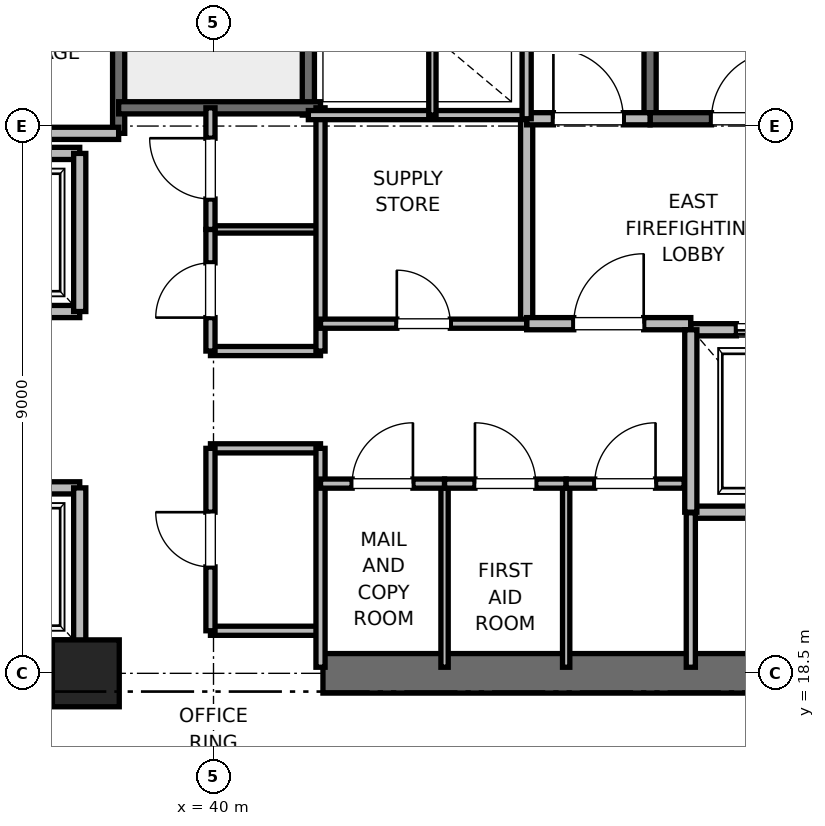
"""IFC4 building model, lengths in metres.
Left out: names, types, materials, properties, quantities, classifications, styles, units other than length and angle.
Written with IfcOpenShell. Run it as: python <this file> out.ifc"""

import sys

from ifc_helpers import new_model, si_unit, direction, frame, frame_2d, origin, origin_2d, place, context, subcontext, project, spatial, rectangle, extrude, element, fill, save


model = new_model("IFC4")
c1 = context("Model", 3, precision=1e-05, world=origin(), true_north=direction((0.0, 1.0)))
c2 = subcontext(c1, "Body", "Model", "MODEL_VIEW")
j1 = project(units=[si_unit("LENGTHUNIT", "METRE"), si_unit("PLANEANGLEUNIT", "RADIAN")], contexts=[c1])
p1 = place(None, origin())
s1 = spatial("IfcSite", under=j1, at=p1, CompositionType="ELEMENT")
p2 = place(p1, origin())
s2 = spatial("IfcBuilding", under=s1, at=p2, CompositionType="ELEMENT")
p3 = place(p2, frame((0.0, 0.0, 75.6)))
s3 = spatial("IfcBuildingStorey", under=s2, at=p3, CompositionType="ELEMENT", Elevation=75.6)
p4 = place(p3, frame((37.9, 18.5, 0.0), z_axis=(0.0, 0.0, 1.0), x_axis=(1.0, 0.0, 0.0)))
e1 = element("IfcColumn", 1, at=p4, inside=s3, PredefinedType="PILASTER", context=c2, shape_type="SweptSolid", body=[
    extrude(rectangle(XDim=1.1, YDim=1.1, at=origin_2d()), origin(), (0.0, 0.0, 1.0), 4.0),
])
for number, where, z_axis, x_axis in (
    (2, (29.0, 18.5, 0.0), (0.0, 0.0, 1.0), (1.0, 0.0, 0.0)),
    (3, (41.8, 18.5, 0.0), (0.0, 0.0, 1.0), (1.0, 0.0, 0.0)),
):
    element("IfcWall", number, at=place(p3, frame(where, z_axis=z_axis, x_axis=x_axis)), inside=s3, PredefinedType="SHEAR", context=c2, shape_type="SweptSolid", body=[
        extrude(rectangle(XDim=9.2, YDim=0.65, at=frame_2d((4.6, 0.0))), origin(), (0.0, 0.0, 1.0), 3.76),
    ])
p5 = place(p3, frame((47.18, 27.62, 0.0), z_axis=(0.0, 0.0, 1.0), x_axis=(0.0, 1.0, 0.0)))
e4 = element("IfcWall", 4, at=p5, inside=s3, PredefinedType="SOLIDWALL", context=c2, shape_type="SweptSolid", body=[
    extrude(rectangle(XDim=8.18, YDim=0.2, at=frame_2d((4.09, 0.0))), origin(), (0.0, 0.0, 1.0), 3.76),
])
p6 = place(p3, frame((47.18, 27.62, 0.0), z_axis=(0.0, 0.0, 1.0), x_axis=(1.0, 0.0, 0.0)))
e5 = element("IfcWall", 5, at=p6, inside=s3, PredefinedType="SOLIDWALL", context=c2, shape_type="SweptSolid", body=[
    extrude(rectangle(XDim=3.12, YDim=0.2, at=frame_2d((1.56, 0.0))), origin(), (0.0, 0.0, 1.0), 3.76),
])
p7 = place(p6, frame((1.01, 0.0, 0.0)))
e6 = element("IfcOpeningElement", 6, at=p7, cuts=e5, PredefinedType="OPENING", context=c2, shape_type="SweptSolid", body=[
    extrude(rectangle(XDim=1.1, YDim=2.15, at=frame_2d((0.55, 1.075))), frame((0.0, 0.1, 0.0), z_axis=(0.0, -1.0, 0.0), x_axis=(1.0, 0.0, 0.0)), (0.0, 0.0, 1.0), 0.2),
])
p8 = place(p3, frame((38.44, 27.38, 0.0), z_axis=(0.0, 0.0, 1.0), x_axis=(0.0, 1.0, 0.0)))
e7 = element("IfcWall", 7, at=p8, inside=s3, PredefinedType="SOLIDWALL", context=c2, shape_type="SweptSolid", body=[
    extrude(rectangle(XDim=8.87, YDim=0.2, at=frame_2d((4.435, 0.0))), origin(), (0.0, 0.0, 1.0), 3.76),
])
p9 = place(p3, frame((41.56, 27.68, 0.0), z_axis=(0.0, 0.0, 1.0), x_axis=(0.0, 1.0, 0.0)))
e8 = element("IfcWall", 8, at=p9, inside=s3, PredefinedType="SOLIDWALL", context=c2, shape_type="SweptSolid", body=[
    extrude(rectangle(XDim=8.57, YDim=0.2, at=frame_2d((4.285, 0.0))), origin(), (0.0, 0.0, 1.0), 3.76),
])
p10 = place(p3, frame((38.44, 27.8, 0.0), z_axis=(0.0, 0.0, 1.0), x_axis=(1.0, 0.0, 0.0)))
e9 = element("IfcWall", 9, at=p10, inside=s3, PredefinedType="SOLIDWALL", context=c2, shape_type="SweptSolid", body=[
    extrude(rectangle(XDim=3.32, YDim=0.2, at=frame_2d((1.66, 0.0))), origin(), (0.0, 0.0, 1.0), 3.76),
])
p11 = place(p3, frame((32.82, 27.38, 0.0), z_axis=(0.0, 0.0, 1.0), x_axis=(1.0, 0.0, 0.0)))
e10 = element("IfcWall", 10, at=p11, inside=s3, PredefinedType="PARTITIONING", context=c2, shape_type="SweptSolid", body=[
    extrude(rectangle(XDim=5.62, YDim=0.2, at=frame_2d((2.81, 0.0))), origin(), (0.0, 0.0, 1.0), 3.76),
])
p12 = place(p3, frame((45.15, 24.25, 0.0), z_axis=(0.0, 0.0, 1.0), x_axis=(0.0, 1.0, 0.0)))
e11 = element("IfcWall", 11, at=p12, inside=s3, PredefinedType="PARTITIONING", context=c2, shape_type="SweptSolid", body=[
    extrude(rectangle(XDim=3.37, YDim=0.2, at=frame_2d((1.685, 0.0))), origin(), (0.0, 0.0, 1.0), 3.76),
])
p13 = place(p3, frame((45.15, 24.25, 0.0), z_axis=(0.0, 0.0, 1.0), x_axis=(1.0, 0.0, 0.0)))
e12 = element("IfcWall", 12, at=p13, inside=s3, PredefinedType="PARTITIONING", context=c2, shape_type="SweptSolid", body=[
    extrude(rectangle(XDim=2.7, YDim=0.2, at=frame_2d((1.35, 0.0))), origin(), (0.0, 0.0, 1.0), 3.76),
])
p14 = place(p13, frame((0.775, 0.0, 0.0)))
e13 = element("IfcOpeningElement", 13, at=p14, cuts=e12, PredefinedType="OPENING", context=c2, shape_type="SweptSolid", body=[
    extrude(rectangle(XDim=1.15, YDim=2.2, at=frame_2d((0.575, 1.1))), frame((0.0, 0.1, 0.0), z_axis=(0.0, -1.0, 0.0), x_axis=(1.0, 0.0, 0.0)), (0.0, 0.0, 1.0), 0.2),
])
p15 = place(p3, frame((45.15, 27.62, 0.0), z_axis=(0.0, 0.0, 1.0), x_axis=(1.0, 0.0, 0.0)))
e14 = element("IfcWall", 14, at=p15, inside=s3, PredefinedType="PARTITIONING", context=c2, shape_type="SweptSolid", body=[
    extrude(rectangle(XDim=2.03, YDim=0.2, at=frame_2d((1.015, 0.0))), origin(), (0.0, 0.0, 1.0), 3.76),
])
p16 = place(p15, frame((0.44, 0.0, 0.0)))
e15 = element("IfcOpeningElement", 15, at=p16, cuts=e14, PredefinedType="OPENING", context=c2, shape_type="SweptSolid", body=[
    extrude(rectangle(XDim=1.15, YDim=2.2, at=frame_2d((0.575, 1.1))), frame((0.0, 0.1, 0.0), z_axis=(0.0, -1.0, 0.0), x_axis=(1.0, 0.0, 0.0)), (0.0, 0.0, 1.0), 0.2),
])
p17 = place(p3, frame((47.85, 21.15, 0.0), z_axis=(0.0, 0.0, 1.0), x_axis=(1.0, 0.0, 0.0)))
e16 = element("IfcWall", 16, at=p17, inside=s3, PredefinedType="SOLIDWALL", context=c2, shape_type="SweptSolid", body=[
    extrude(rectangle(XDim=2.6, YDim=0.2, at=frame_2d((1.3, 0.0))), origin(), (0.0, 0.0, 1.0), 3.76),
])
p18 = place(p3, frame((50.45, 24.15, 0.0), z_axis=(0.0, 0.0, 1.0), x_axis=(-1.0, 0.0, 0.0)))
e17 = element("IfcWall", 17, at=p18, inside=s3, PredefinedType="SOLIDWALL", context=c2, shape_type="SweptSolid", body=[
    extrude(rectangle(XDim=2.6, YDim=0.2, at=frame_2d((1.3, 0.0))), origin(), (0.0, 0.0, 1.0), 2.54),
])
p19 = place(p18, frame((0.75, 0.0, 0.0)))
e18 = element("IfcOpeningElement", 18, at=p19, cuts=e17, PredefinedType="OPENING", context=c2, shape_type="SweptSolid", body=[
    extrude(rectangle(XDim=1.1, YDim=2.2, at=frame_2d((0.55, 1.1))), frame((0.0, 0.1, 0.0), z_axis=(0.0, -1.0, 0.0), x_axis=(1.0, 0.0, 0.0)), (0.0, 0.0, 1.0), 0.2),
])
p20 = place(p3, frame((47.85, 24.15, 0.0), z_axis=(0.0, 0.0, 1.0), x_axis=(0.0, -1.0, 0.0)))
e19 = element("IfcWall", 19, at=p20, inside=s3, PredefinedType="SOLIDWALL", context=c2, shape_type="SweptSolid", body=[
    extrude(rectangle(XDim=3.0, YDim=0.2, at=frame_2d((1.5, 0.0))), origin(), (0.0, 0.0, 1.0), 3.76),
])
p21 = place(p3, frame((35.5, 18.95, 0.0), z_axis=(0.0, 0.0, 1.0), x_axis=(1.0, 0.0, 0.0)))
e20 = element("IfcWall", 20, at=p21, inside=s3, PredefinedType="SOLIDWALL", context=c2, shape_type="SweptSolid", body=[
    extrude(rectangle(XDim=2.3, YDim=0.2, at=frame_2d((1.15, 0.0))), origin(), (0.0, 0.0, 1.0), 2.54),
])
p22 = place(p3, frame((37.8, 21.55, 0.0), z_axis=(0.0, 0.0, 1.0), x_axis=(-1.0, 0.0, 0.0)))
e21 = element("IfcWall", 21, at=p22, inside=s3, PredefinedType="SOLIDWALL", context=c2, shape_type="SweptSolid", body=[
    extrude(rectangle(XDim=2.3, YDim=0.2, at=frame_2d((1.15, 0.0))), origin(), (0.0, 0.0, 1.0), 3.76),
])
p23 = place(p22, frame((0.6, 0.0, 0.0)))
e22 = element("IfcOpeningElement", 22, at=p23, cuts=e21, PredefinedType="OPENING", context=c2, shape_type="SweptSolid", body=[
    extrude(rectangle(XDim=1.1, YDim=2.2, at=frame_2d((0.55, 1.1))), frame((0.0, 0.1, 0.0), z_axis=(0.0, -1.0, 0.0), x_axis=(1.0, 0.0, 0.0)), (0.0, 0.0, 1.0), 0.2),
])
p24 = place(p3, frame((37.8, 18.95, 0.0), z_axis=(0.0, 0.0, 1.0), x_axis=(0.0, 1.0, 0.0)))
e23 = element("IfcWall", 23, at=p24, inside=s3, PredefinedType="SOLIDWALL", context=c2, shape_type="SweptSolid", body=[
    extrude(rectangle(XDim=2.6, YDim=0.2, at=frame_2d((1.3, 0.0))), origin(), (0.0, 0.0, 1.0), 2.54),
])
p25 = place(p3, frame((35.5, 24.45, 0.0), z_axis=(0.0, 0.0, 1.0), x_axis=(1.0, 0.0, 0.0)))
e24 = element("IfcWall", 24, at=p25, inside=s3, PredefinedType="SOLIDWALL", context=c2, shape_type="SweptSolid", body=[
    extrude(rectangle(XDim=2.3, YDim=0.2, at=frame_2d((1.15, 0.0))), origin(), (0.0, 0.0, 1.0), 3.76),
])
p26 = place(p25, frame((0.6, 0.0, 0.0)))
e25 = element("IfcOpeningElement", 25, at=p26, cuts=e24, PredefinedType="OPENING", context=c2, shape_type="SweptSolid", body=[
    extrude(rectangle(XDim=1.1, YDim=2.2, at=frame_2d((0.55, 1.1))), frame((0.0, 0.1, 0.0), z_axis=(0.0, -1.0, 0.0), x_axis=(1.0, 0.0, 0.0)), (0.0, 0.0, 1.0), 0.2),
])
p27 = place(p3, frame((37.8, 27.05, 0.0), z_axis=(0.0, 0.0, 1.0), x_axis=(-1.0, 0.0, 0.0)))
e26 = element("IfcWall", 26, at=p27, inside=s3, PredefinedType="SOLIDWALL", context=c2, shape_type="SweptSolid", body=[
    extrude(rectangle(XDim=2.3, YDim=0.2, at=frame_2d((1.15, 0.0))), origin(), (0.0, 0.0, 1.0), 3.76),
])
p28 = place(p3, frame((37.8, 24.45, 0.0), z_axis=(0.0, 0.0, 1.0), x_axis=(0.0, 1.0, 0.0)))
e27 = element("IfcWall", 27, at=p28, inside=s3, PredefinedType="SOLIDWALL", context=c2, shape_type="SweptSolid", body=[
    extrude(rectangle(XDim=2.6, YDim=0.2, at=frame_2d((1.3, 0.0))), origin(), (0.0, 0.0, 1.0), 3.76),
])
for number, where, z_axis, x_axis in (
    (28, (39.95, 19.2, 0.0), (0.0, 0.0, 1.0), (1.0, 0.0, 0.0)),
    (29, (39.95, 22.2, 0.0), (0.0, 0.0, 1.0), (1.0, 0.0, 0.0)),
    (30, (39.95, 23.8, 0.0), (0.0, 0.0, 1.0), (1.0, 0.0, 0.0)),
):
    element("IfcWall", number, at=place(p3, frame(where, z_axis=z_axis, x_axis=x_axis)), inside=s3, PredefinedType="PARTITIONING", context=c2, shape_type="SweptSolid", body=[
        extrude(rectangle(XDim=1.81, YDim=0.15, at=frame_2d((0.905, 0.0))), origin(), (0.0, 0.0, 1.0), 2.85),
    ])
p29 = place(p3, frame((39.95, 25.8, 0.0), z_axis=(0.0, 0.0, 1.0), x_axis=(1.0, 0.0, 0.0)))
e31 = element("IfcWall", 31, at=p29, inside=s3, PredefinedType="PARTITIONING", context=c2, shape_type="SweptSolid", body=[
    extrude(rectangle(XDim=1.81, YDim=0.12, at=frame_2d((0.905, 0.0))), origin(), (0.0, 0.0, 1.0), 2.85),
])
p30 = place(p3, frame((41.76, 18.6, 0.0), z_axis=(0.0, 0.0, 1.0), x_axis=(0.0, 1.0, 0.0)))
e32 = element("IfcWall", 32, at=p30, inside=s3, PredefinedType="PARTITIONING", context=c2, shape_type="SweptSolid", body=[
    extrude(rectangle(XDim=3.6, YDim=0.15, at=frame_2d((1.8, 0.0))), origin(), (0.0, 0.0, 1.0), 2.54),
])
p31 = place(p3, frame((41.76, 23.8, 0.0), z_axis=(0.0, 0.0, 1.0), x_axis=(0.0, 1.0, 0.0)))
e33 = element("IfcWall", 33, at=p31, inside=s3, PredefinedType="PARTITIONING", context=c2, shape_type="SweptSolid", body=[
    extrude(rectangle(XDim=4.0, YDim=0.15, at=frame_2d((2.0, 0.0))), origin(), (0.0, 0.0, 1.0), 2.85),
])
p32 = place(p3, frame((39.95, 19.2, 0.0), z_axis=(0.0, 0.0, 1.0), x_axis=(0.0, 1.0, 0.0)))
e34 = element("IfcWall", 34, at=p32, inside=s3, PredefinedType="PARTITIONING", context=c2, shape_type="SweptSolid", body=[
    extrude(rectangle(XDim=3.0, YDim=0.15, at=frame_2d((1.5, 0.0))), origin(), (0.0, 0.0, 1.0), 2.85),
])
p33 = place(p32, frame((1.05, 0.0, 0.0)))
e35 = element("IfcOpeningElement", 35, at=p33, cuts=e34, PredefinedType="OPENING", context=c2, shape_type="SweptSolid", body=[
    extrude(rectangle(XDim=0.9, YDim=2.1, at=frame_2d((0.45, 1.05))), frame((0.0, 0.075, 0.0), z_axis=(0.0, -1.0, 0.0), x_axis=(1.0, 0.0, 0.0)), (0.0, 0.0, 1.0), 0.15),
])
p34 = place(p3, frame((39.95, 23.8, 0.0), z_axis=(0.0, 0.0, 1.0), x_axis=(0.0, 1.0, 0.0)))
e36 = element("IfcWall", 36, at=p34, inside=s3, PredefinedType="PARTITIONING", context=c2, shape_type="SweptSolid", body=[
    extrude(rectangle(XDim=2.0, YDim=0.15, at=frame_2d((1.0, 0.0))), origin(), (0.0, 0.0, 1.0), 2.85),
])
p35 = place(p34, frame((0.55, 0.0, 0.0)))
e37 = element("IfcOpeningElement", 37, at=p35, cuts=e36, PredefinedType="OPENING", context=c2, shape_type="SweptSolid", body=[
    extrude(rectangle(XDim=0.9, YDim=2.1, at=frame_2d((0.45, 1.05))), frame((0.0, 0.075, 0.0), z_axis=(0.0, -1.0, 0.0), x_axis=(1.0, 0.0, 0.0)), (0.0, 0.0, 1.0), 0.15),
])
p36 = place(p3, frame((39.95, 25.8, 0.0), z_axis=(0.0, 0.0, 1.0), x_axis=(0.0, 1.0, 0.0)))
e38 = element("IfcWall", 38, at=p36, inside=s3, PredefinedType="PARTITIONING", context=c2, shape_type="SweptSolid", body=[
    extrude(rectangle(XDim=2.0, YDim=0.15, at=frame_2d((1.0, 0.0))), origin(), (0.0, 0.0, 1.0), 2.85),
])
p37 = place(p36, frame((0.5, 0.0, 0.0)))
e39 = element("IfcOpeningElement", 39, at=p37, cuts=e38, PredefinedType="OPENING", context=c2, shape_type="SweptSolid", body=[
    extrude(rectangle(XDim=1.0, YDim=2.15, at=frame_2d((0.5, 1.075))), frame((0.0, 0.075, 0.0), z_axis=(0.0, -1.0, 0.0), x_axis=(1.0, 0.0, 0.0)), (0.0, 0.0, 1.0), 0.15),
])
p38 = place(p3, frame((41.56, 27.68, 0.0), z_axis=(0.0, 0.0, 1.0), x_axis=(1.0, 0.0, 0.0)))
e40 = element("IfcWall", 40, at=p38, inside=s3, PredefinedType="PARTITIONING", context=c2, shape_type="SweptSolid", body=[
    extrude(rectangle(XDim=3.59, YDim=0.15, at=frame_2d((1.795, 0.0))), origin(), (0.0, 0.0, 1.0), 2.85),
])
p39 = place(p3, frame((47.85, 18.6, 0.0), z_axis=(0.0, 0.0, 1.0), x_axis=(0.0, 1.0, 0.0)))
e41 = element("IfcWall", 41, at=p39, inside=s3, PredefinedType="PARTITIONING", context=c2, shape_type="SweptSolid", body=[
    extrude(rectangle(XDim=2.54, YDim=0.15, at=frame_2d((1.27, 0.0))), origin(), (0.0, 0.0, 1.0), 2.85),
])
for number, where, z_axis, x_axis in (
    (42, (43.8, 18.6, 0.0), (0.0, 0.0, 1.0), (0.0, 1.0, 0.0)),
    (43, (45.8, 18.6, 0.0), (0.0, 0.0, 1.0), (0.0, 1.0, 0.0)),
):
    element("IfcWall", number, at=place(p3, frame(where, z_axis=z_axis, x_axis=x_axis)), inside=s3, PredefinedType="PARTITIONING", context=c2, shape_type="SweptSolid", body=[
        extrude(rectangle(XDim=3.02, YDim=0.12, at=frame_2d((1.51, 0.0))), origin(), (0.0, 0.0, 1.0), 2.85),
    ])
p40 = place(p3, frame((41.76, 21.62, 0.0), z_axis=(0.0, 0.0, 1.0), x_axis=(1.0, 0.0, 0.0)))
e44 = element("IfcWall", 44, at=p40, inside=s3, PredefinedType="PARTITIONING", context=c2, shape_type="SweptSolid", body=[
    extrude(rectangle(XDim=2.04, YDim=0.15, at=frame_2d((1.02, 0.0))), origin(), (0.0, 0.0, 1.0), 2.85),
])
p41 = place(p40, frame((0.52, 0.0, 0.0)))
e45 = element("IfcOpeningElement", 45, at=p41, cuts=e44, PredefinedType="OPENING", context=c2, shape_type="SweptSolid", body=[
    extrude(rectangle(XDim=1.0, YDim=2.15, at=frame_2d((0.5, 1.075))), frame((0.0, 0.075, 0.0), z_axis=(0.0, -1.0, 0.0), x_axis=(1.0, 0.0, 0.0)), (0.0, 0.0, 1.0), 0.15),
])
p42 = place(p3, frame((43.8, 21.62, 0.0), z_axis=(0.0, 0.0, 1.0), x_axis=(1.0, 0.0, 0.0)))
e46 = element("IfcWall", 46, at=p42, inside=s3, PredefinedType="PARTITIONING", context=c2, shape_type="SweptSolid", body=[
    extrude(rectangle(XDim=2.0, YDim=0.15, at=frame_2d((1.0, 0.0))), origin(), (0.0, 0.0, 1.0), 2.85),
])
p43 = place(p42, frame((0.5, 0.0, 0.0)))
e47 = element("IfcOpeningElement", 47, at=p43, cuts=e46, PredefinedType="OPENING", context=c2, shape_type="SweptSolid", body=[
    extrude(rectangle(XDim=1.0, YDim=2.15, at=frame_2d((0.5, 1.075))), frame((0.0, 0.075, 0.0), z_axis=(0.0, -1.0, 0.0), x_axis=(1.0, 0.0, 0.0)), (0.0, 0.0, 1.0), 0.15),
])
p44 = place(p3, frame((45.8, 21.62, 0.0), z_axis=(0.0, 0.0, 1.0), x_axis=(1.0, 0.0, 0.0)))
e48 = element("IfcWall", 48, at=p44, inside=s3, PredefinedType="PARTITIONING", context=c2, shape_type="SweptSolid", body=[
    extrude(rectangle(XDim=1.94, YDim=0.15, at=frame_2d((0.97, 0.0))), origin(), (0.0, 0.0, 1.0), 2.85),
])
p45 = place(p44, frame((0.47, 0.0, 0.0)))
e49 = element("IfcOpeningElement", 49, at=p45, cuts=e48, PredefinedType="OPENING", context=c2, shape_type="SweptSolid", body=[
    extrude(rectangle(XDim=1.0, YDim=2.15, at=frame_2d((0.5, 1.075))), frame((0.0, 0.075, 0.0), z_axis=(0.0, -1.0, 0.0), x_axis=(1.0, 0.0, 0.0)), (0.0, 0.0, 1.0), 0.15),
])
p46 = place(p3, frame((41.76, 24.25, 0.0), z_axis=(0.0, 0.0, 1.0), x_axis=(1.0, 0.0, 0.0)))
e50 = element("IfcWall", 50, at=p46, inside=s3, PredefinedType="PARTITIONING", context=c2, shape_type="SweptSolid", body=[
    extrude(rectangle(XDim=3.39, YDim=0.15, at=frame_2d((1.695, 0.0))), origin(), (0.0, 0.0, 1.0), 2.85),
])
p47 = place(p46, frame((1.255, 0.0, 0.0)))
e51 = element("IfcOpeningElement", 51, at=p47, cuts=e50, PredefinedType="OPENING", context=c2, shape_type="SweptSolid", body=[
    extrude(rectangle(XDim=0.88, YDim=2.1, at=frame_2d((0.44, 1.05))), frame((0.0, 0.075, 0.0), z_axis=(0.0, -1.0, 0.0), x_axis=(1.0, 0.0, 0.0)), (0.0, 0.0, 1.0), 0.15),
])
p48 = place(p3, frame((45.15, 27.62, 0.0), z_axis=(0.0, 0.0, 1.0), x_axis=(0.0, 1.0, 0.0)))
e52 = element("IfcWall", 52, at=p48, inside=s3, PredefinedType="PARTITIONING", context=c2, shape_type="SweptSolid", body=[
    extrude(rectangle(XDim=3.1, YDim=0.15, at=frame_2d((1.55, 0.0))), origin(), (0.0, 0.0, 1.0), 2.85),
])
p49 = place(p3, frame((43.6, 27.68, 0.0), z_axis=(0.0, 0.0, 1.0), x_axis=(0.0, 1.0, 0.0)))
e53 = element("IfcWall", 53, at=p49, inside=s3, PredefinedType="PARTITIONING", context=c2, shape_type="SweptSolid", body=[
    extrude(rectangle(XDim=3.04, YDim=0.12, at=frame_2d((1.52, 0.0))), origin(), (0.0, 0.0, 1.0), 2.85),
])
p50 = place(p7, origin())
e54 = element("IfcDoor", 54, at=p50, inside=s3, OperationType="SINGLE_SWING_RIGHT", PredefinedType="DOOR", context=c2, shape_type="SweptSolid", body=[
    extrude(rectangle(XDim=1.1, YDim=2.15, at=frame_2d((0.55, 1.075))), frame((0.0, 0.025, 0.0), z_axis=(0.0, -1.0, 0.0), x_axis=(1.0, 0.0, 0.0)), (0.0, 0.0, 1.0), 0.05),
])
fill(e6, e54)
p51 = place(p14, origin())
e55 = element("IfcDoor", 55, at=p51, inside=s3, OperationType="SINGLE_SWING_RIGHT", PredefinedType="DOOR", context=c2, shape_type="SweptSolid", body=[
    extrude(rectangle(XDim=1.15, YDim=2.2, at=frame_2d((0.575, 1.1))), frame((0.0, 0.025, 0.0), z_axis=(0.0, -1.0, 0.0), x_axis=(1.0, 0.0, 0.0)), (0.0, 0.0, 1.0), 0.05),
])
fill(e13, e55)
p52 = place(p16, origin())
e56 = element("IfcDoor", 56, at=p52, inside=s3, OperationType="SINGLE_SWING_LEFT", PredefinedType="DOOR", context=c2, shape_type="SweptSolid", body=[
    extrude(rectangle(XDim=1.15, YDim=2.2, at=frame_2d((0.575, 1.1))), frame((0.0, 0.025, 0.0), z_axis=(0.0, -1.0, 0.0), x_axis=(1.0, 0.0, 0.0)), (0.0, 0.0, 1.0), 0.05),
])
fill(e15, e56)
p53 = place(p19, origin())
e57 = element("IfcDoor", 57, at=p53, inside=s3, OperationType="SLIDING_TO_RIGHT", PredefinedType="DOOR", context=c2, shape_type="SweptSolid", body=[
    extrude(rectangle(XDim=1.1, YDim=2.2, at=frame_2d((0.55, 1.1))), frame((0.0, 0.025, 0.0), z_axis=(0.0, -1.0, 0.0), x_axis=(1.0, 0.0, 0.0)), (0.0, 0.0, 1.0), 0.05),
])
fill(e18, e57)
p54 = place(p33, origin())
e58 = element("IfcDoor", 58, at=p54, inside=s3, OperationType="SINGLE_SWING_RIGHT", PredefinedType="DOOR", context=c2, shape_type="SweptSolid", body=[
    extrude(rectangle(XDim=0.9, YDim=2.1, at=frame_2d((0.45, 1.05))), frame((0.0, 0.025, 0.0), z_axis=(0.0, -1.0, 0.0), x_axis=(1.0, 0.0, 0.0)), (0.0, 0.0, 1.0), 0.05),
])
fill(e35, e58)
p55 = place(p35, origin())
e59 = element("IfcDoor", 59, at=p55, inside=s3, OperationType="SINGLE_SWING_LEFT", PredefinedType="DOOR", context=c2, shape_type="SweptSolid", body=[
    extrude(rectangle(XDim=0.9, YDim=2.1, at=frame_2d((0.45, 1.05))), frame((0.0, 0.025, 0.0), z_axis=(0.0, -1.0, 0.0), x_axis=(1.0, 0.0, 0.0)), (0.0, 0.0, 1.0), 0.05),
])
fill(e37, e59)
p56 = place(p37, origin())
e60 = element("IfcDoor", 60, at=p56, inside=s3, OperationType="SINGLE_SWING_RIGHT", PredefinedType="DOOR", context=c2, shape_type="SweptSolid", body=[
    extrude(rectangle(XDim=1.0, YDim=2.15, at=frame_2d((0.5, 1.075))), frame((0.0, 0.025, 0.0), z_axis=(0.0, -1.0, 0.0), x_axis=(1.0, 0.0, 0.0)), (0.0, 0.0, 1.0), 0.05),
])
fill(e39, e60)
p57 = place(p41, origin())
e61 = element("IfcDoor", 61, at=p57, inside=s3, OperationType="SINGLE_SWING_RIGHT", PredefinedType="DOOR", context=c2, shape_type="SweptSolid", body=[
    extrude(rectangle(XDim=1.0, YDim=2.15, at=frame_2d((0.5, 1.075))), frame((0.0, 0.025, 0.0), z_axis=(0.0, -1.0, 0.0), x_axis=(1.0, 0.0, 0.0)), (0.0, 0.0, 1.0), 0.05),
])
fill(e45, e61)
p58 = place(p43, origin())
e62 = element("IfcDoor", 62, at=p58, inside=s3, OperationType="SINGLE_SWING_LEFT", PredefinedType="DOOR", context=c2, shape_type="SweptSolid", body=[
    extrude(rectangle(XDim=1.0, YDim=2.15, at=frame_2d((0.5, 1.075))), frame((0.0, 0.025, 0.0), z_axis=(0.0, -1.0, 0.0), x_axis=(1.0, 0.0, 0.0)), (0.0, 0.0, 1.0), 0.05),
])
fill(e47, e62)
p59 = place(p45, origin())
e63 = element("IfcDoor", 63, at=p59, inside=s3, OperationType="SINGLE_SWING_RIGHT", PredefinedType="DOOR", context=c2, shape_type="SweptSolid", body=[
    extrude(rectangle(XDim=1.0, YDim=2.15, at=frame_2d((0.5, 1.075))), frame((0.0, 0.025, 0.0), z_axis=(0.0, -1.0, 0.0), x_axis=(1.0, 0.0, 0.0)), (0.0, 0.0, 1.0), 0.05),
])
fill(e49, e63)
p60 = place(p47, origin())
e64 = element("IfcDoor", 64, at=p60, inside=s3, OperationType="SINGLE_SWING_LEFT", PredefinedType="DOOR", context=c2, shape_type="SweptSolid", body=[
    extrude(rectangle(XDim=0.88, YDim=2.1, at=frame_2d((0.44, 1.05))), frame((0.0, 0.025, 0.0), z_axis=(0.0, -1.0, 0.0), x_axis=(1.0, 0.0, 0.0)), (0.0, 0.0, 1.0), 0.05),
])
fill(e51, e64)
save(model, sys.argv[1])
